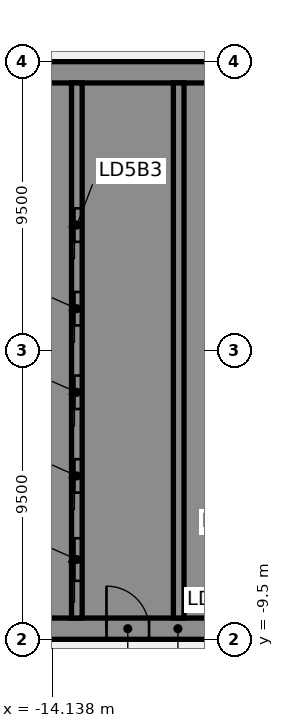
"""IFC4 building model, lengths in metres.
Left out: names, types, materials, properties, quantities, classifications, styles, units other than length and angle.
Written with IfcOpenShell. Run it as: python <this file> out.ifc"""

import sys

from ifc_helpers import new_model, si_unit, direction, frame, frame_2d, origin, place, context, subcontext, project, spatial, polyline, rectangle, outline, extrude, element, fill, save


model = new_model("IFC4")
c1 = context("Model", 3, precision=1e-05, world=origin(), true_north=direction((0.0, 1.0)))
c2 = subcontext(c1, "Body", "Model", "MODEL_VIEW")
j1 = project(units=[si_unit("LENGTHUNIT", "METRE"), si_unit("PLANEANGLEUNIT", "RADIAN")], contexts=[c1])
p1 = place(None, origin())
s1 = spatial("IfcSite", under=j1, at=p1, CompositionType="ELEMENT")
p2 = place(p1, origin())
s2 = spatial("IfcBuilding", under=s1, at=p2, CompositionType="ELEMENT")
p3 = place(p2, frame((0.0, 0.0, -21.0)))
s3 = spatial("IfcBuildingStorey", under=s2, at=p3, CompositionType="ELEMENT", Elevation=-21.0)
p4 = place(p3, frame((-16.5, -9.15, 0.0), z_axis=(0.0, 0.0, 1.0), x_axis=(1.0, 0.0, 0.0)))
e1 = element("IfcWall", 1, at=p4, inside=s3, PredefinedType="SHEAR", context=c2, shape_type="SweptSolid", body=[
    extrude(rectangle(XDim=13.0, YDim=0.7, at=frame_2d((6.5, 0.0))), origin(), (0.0, 0.0, 1.0), 6.55),
])
p5 = place(p4, frame((4.15, 0.0, 0.0)))
e2 = element("IfcOpeningElement", 2, at=p5, cuts=e1, PredefinedType="OPENING", context=c2, shape_type="SweptSolid", body=[
    extrude(rectangle(XDim=1.4, YDim=2.1, at=frame_2d((0.7, 1.05))), frame((0.0, 0.36, 0.0), z_axis=(0.0, -1.0, 0.0), x_axis=(1.0, 0.0, 0.0)), (0.0, 0.0, 1.0), 0.72),
])
p6 = place(p4, frame((10.125, 0.0, 0.0)))
e3 = element("IfcOpeningElement", 3, at=p6, cuts=e1, PredefinedType="OPENING", context=c2, shape_type="SweptSolid", body=[
    extrude(rectangle(XDim=1.4, YDim=2.1, at=frame_2d((0.7, 1.05))), frame((0.0, 0.36, 0.0), z_axis=(0.0, -1.0, 0.0), x_axis=(1.0, 0.0, 0.0)), (0.0, 0.0, 1.0), 0.72),
])
p7 = place(p3, origin())
e4 = element("IfcWall", 4, at=p7, inside=s3, PredefinedType="SHEAR", context=c2, shape_type="SweptSolid", body=[
    extrude(outline(polyline([(-13.5, -8.8), (-13.5, -8.125), (-15.8, -8.125), (-15.8, -5.625), (-13.5, -5.625), (-13.5, -5.375), (-15.8, -5.375), (-15.8, -2.875), (-13.5, -2.875), (-13.5, -2.625), (-15.8, -2.625), (-15.8, -0.125), (-13.5, -0.125), (-13.5, 0.125), (-15.8, 0.125), (-15.8, 2.625), (-13.5, 2.625), (-13.5, 2.875), (-15.8, 2.875), (-15.8, 5.375), (-13.5, 5.375), (-13.5, 5.625), (-15.8, 5.625), (-15.8, 8.125), (-13.5, 8.125), (-13.5, 8.8), (-15.8, 8.8), (-16.5, 8.8), (-16.5, -8.8), (-15.8, -8.8), (-13.5, -8.8)])), origin(), (0.0, 0.0, 1.0), 6.55),
])
p8 = place(p3, frame((-16.5, 9.15, 0.0), z_axis=(0.0, 0.0, 1.0), x_axis=(1.0, 0.0, 0.0)))
e5 = element("IfcWall", 5, at=p8, inside=s3, PredefinedType="SHEAR", context=c2, shape_type="SweptSolid", body=[
    extrude(rectangle(XDim=13.0, YDim=0.7, at=frame_2d((6.5, 0.0))), origin(), (0.0, 0.0, 1.0), 6.55),
])
p9 = place(p3, origin())
e6 = element("IfcWall", 6, at=p9, inside=s3, PredefinedType="SHEAR", context=c2, shape_type="SweptSolid", body=[
    extrude(outline(polyline([(-9.8, -5.375), (-9.8, -5.625), (-7.5, -5.625), (-7.15, -5.625), (-7.15, 8.8), (-7.5, 8.8), (-9.8, 8.8), (-9.8, 8.125), (-7.5, 8.125), (-7.5, 5.625), (-9.8, 5.625), (-9.8, 5.375), (-7.5, 5.375), (-7.5, 2.875), (-9.8, 2.875), (-9.8, 2.625), (-7.5, 2.625), (-7.5, 0.125), (-9.8, 0.125), (-9.8, -0.125), (-7.5, -0.125), (-7.5, -2.625), (-9.8, -2.625), (-9.8, -2.875), (-7.5, -2.875), (-7.5, -5.375), (-9.8, -5.375)])), origin(), (0.0, 0.0, 1.0), 6.55),
])
p10 = place(p3, origin())
e7 = element("IfcWall", 7, at=p10, inside=s3, PredefinedType="SHEAR", context=c2, shape_type="SweptSolid", body=[
    extrude(outline(polyline([(-7.5, -8.125), (-9.55, -8.125), (-9.55, -5.625), (-9.8, -5.625), (-9.8, -8.125), (-9.8, -8.8), (-7.5, -8.8), (-7.5, -8.125)])), origin(), (0.0, 0.0, 1.0), 6.55),
])
p11 = place(p3, frame((-13.325, -8.8, 0.0), z_axis=(0.0, 0.0, 1.0), x_axis=(0.0, 1.0, 0.0)))
e8 = element("IfcWall", 8, at=p11, inside=s3, PredefinedType="SHEAR", context=c2, shape_type="SweptSolid", body=[
    extrude(rectangle(XDim=17.6, YDim=0.35, at=frame_2d((8.8, 0.0))), origin(), (0.0, 0.0, 1.0), 6.55),
])
p12 = place(p11, frame((1.225, 0.0, 0.0)))
e9 = element("IfcOpeningElement", 9, at=p12, cuts=e8, PredefinedType="OPENING", context=c2, shape_type="SweptSolid", body=[
    extrude(rectangle(XDim=1.4, YDim=2.1, at=frame_2d((0.7, 1.05))), frame((0.0, 0.185, 0.0), z_axis=(0.0, -1.0, 0.0), x_axis=(1.0, 0.0, 0.0)), (0.0, 0.0, 1.0), 0.37),
])
p13 = place(p11, frame((4.125, 0.0, 0.0)))
e10 = element("IfcOpeningElement", 10, at=p13, cuts=e8, PredefinedType="OPENING", context=c2, shape_type="SweptSolid", body=[
    extrude(rectangle(XDim=1.1, YDim=2.1, at=frame_2d((0.55, 1.05))), frame((0.0, 0.185, 0.0), z_axis=(0.0, -1.0, 0.0), x_axis=(1.0, 0.0, 0.0)), (0.0, 0.0, 1.0), 0.37),
])
p14 = place(p11, frame((6.875, 0.0, 0.0)))
e11 = element("IfcOpeningElement", 11, at=p14, cuts=e8, PredefinedType="OPENING", context=c2, shape_type="SweptSolid", body=[
    extrude(rectangle(XDim=1.1, YDim=2.1, at=frame_2d((0.55, 1.05))), frame((0.0, 0.185, 0.0), z_axis=(0.0, -1.0, 0.0), x_axis=(1.0, 0.0, 0.0)), (0.0, 0.0, 1.0), 0.37),
])
p15 = place(p11, frame((9.625, 0.0, 0.0)))
e12 = element("IfcOpeningElement", 12, at=p15, cuts=e8, PredefinedType="OPENING", context=c2, shape_type="SweptSolid", body=[
    extrude(rectangle(XDim=1.1, YDim=2.1, at=frame_2d((0.55, 1.05))), frame((0.0, 0.185, 0.0), z_axis=(0.0, -1.0, 0.0), x_axis=(1.0, 0.0, 0.0)), (0.0, 0.0, 1.0), 0.37),
])
p16 = place(p11, frame((12.375, 0.0, 0.0)))
e13 = element("IfcOpeningElement", 13, at=p16, cuts=e8, PredefinedType="OPENING", context=c2, shape_type="SweptSolid", body=[
    extrude(rectangle(XDim=1.1, YDim=2.1, at=frame_2d((0.55, 1.05))), frame((0.0, 0.185, 0.0), z_axis=(0.0, -1.0, 0.0), x_axis=(1.0, 0.0, 0.0)), (0.0, 0.0, 1.0), 0.37),
])
p17 = place(p3, frame((-9.975, -8.8, 0.0), z_axis=(0.0, 0.0, 1.0), x_axis=(0.0, 1.0, 0.0)))
e14 = element("IfcWall", 14, at=p17, inside=s3, PredefinedType="SHEAR", context=c2, shape_type="SweptSolid", body=[
    extrude(rectangle(XDim=17.6, YDim=0.35, at=frame_2d((8.8, 0.0))), origin(), (0.0, 0.0, 1.0), 6.55),
])
p18 = place(p5, origin())
e15 = element("IfcDoor", 15, at=p18, inside=s3, OperationType="SINGLE_SWING_LEFT", PredefinedType="DOOR", context=c2, shape_type="SweptSolid", body=[
    extrude(rectangle(XDim=1.4, YDim=2.1, at=frame_2d((0.7, 1.05))), frame((0.0, 0.025, 0.0), z_axis=(0.0, -1.0, 0.0), x_axis=(1.0, 0.0, 0.0)), (0.0, 0.0, 1.0), 0.05),
])
fill(e2, e15)
p19 = place(p12, origin())
e16 = element("IfcDoor", 16, at=p19, inside=s3, OperationType="SLIDING_TO_LEFT", PredefinedType="DOOR", context=c2, shape_type="SweptSolid", body=[
    extrude(rectangle(XDim=1.4, YDim=2.1, at=frame_2d((0.7, 1.05))), frame((0.0, 0.025, 0.0), z_axis=(0.0, -1.0, 0.0), x_axis=(1.0, 0.0, 0.0)), (0.0, 0.0, 1.0), 0.05),
])
fill(e9, e16)
p20 = place(p13, origin())
e17 = element("IfcDoor", 17, at=p20, inside=s3, OperationType="SLIDING_TO_LEFT", PredefinedType="DOOR", context=c2, shape_type="SweptSolid", body=[
    extrude(rectangle(XDim=1.1, YDim=2.1, at=frame_2d((0.55, 1.05))), frame((0.0, 0.025, 0.0), z_axis=(0.0, -1.0, 0.0), x_axis=(1.0, 0.0, 0.0)), (0.0, 0.0, 1.0), 0.05),
])
fill(e10, e17)
p21 = place(p14, origin())
e18 = element("IfcDoor", 18, at=p21, inside=s3, OperationType="SLIDING_TO_LEFT", PredefinedType="DOOR", context=c2, shape_type="SweptSolid", body=[
    extrude(rectangle(XDim=1.1, YDim=2.1, at=frame_2d((0.55, 1.05))), frame((0.0, 0.025, 0.0), z_axis=(0.0, -1.0, 0.0), x_axis=(1.0, 0.0, 0.0)), (0.0, 0.0, 1.0), 0.05),
])
fill(e11, e18)
p22 = place(p15, origin())
e19 = element("IfcDoor", 19, at=p22, inside=s3, OperationType="SLIDING_TO_LEFT", PredefinedType="DOOR", context=c2, shape_type="SweptSolid", body=[
    extrude(rectangle(XDim=1.1, YDim=2.1, at=frame_2d((0.55, 1.05))), frame((0.0, 0.025, 0.0), z_axis=(0.0, -1.0, 0.0), x_axis=(1.0, 0.0, 0.0)), (0.0, 0.0, 1.0), 0.05),
])
fill(e12, e19)
p23 = place(p16, origin())
e20 = element("IfcDoor", 20, at=p23, inside=s3, OperationType="SLIDING_TO_LEFT", PredefinedType="DOOR", context=c2, shape_type="SweptSolid", body=[
    extrude(rectangle(XDim=1.1, YDim=2.1, at=frame_2d((0.55, 1.05))), frame((0.0, 0.025, 0.0), z_axis=(0.0, -1.0, 0.0), x_axis=(1.0, 0.0, 0.0)), (0.0, 0.0, 1.0), 0.05),
])
fill(e13, e20)
save(model, sys.argv[1])
